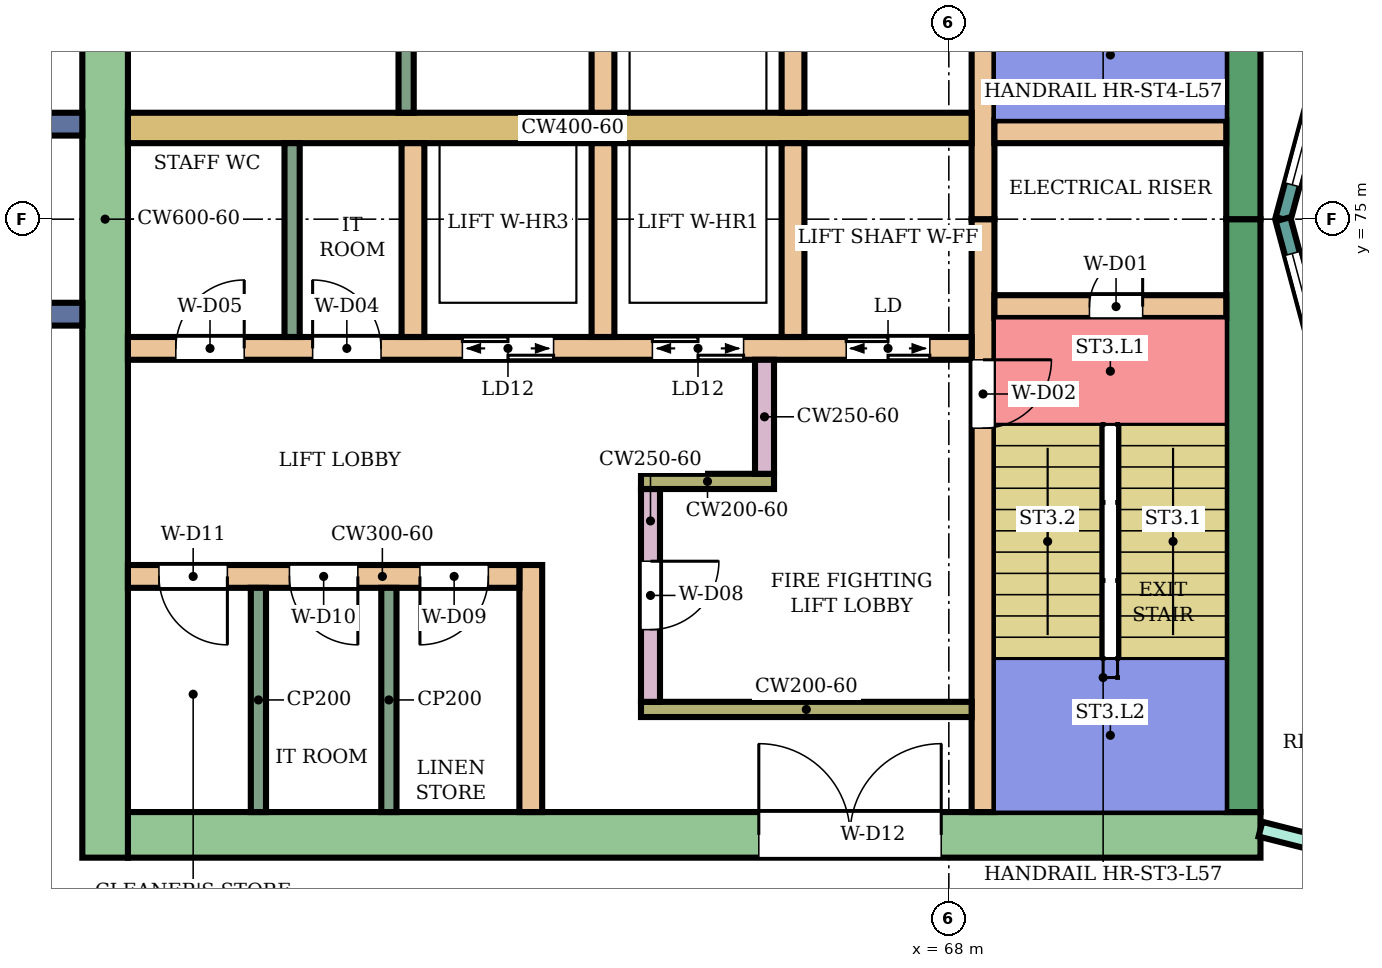
"""IFC4 building model, lengths in metres.
Left out: names, types, materials, properties, quantities, classifications, styles, units other than length and angle.
Written with IfcOpenShell. Run it as: python <this file> out.ifc"""

import sys

from ifc_helpers import new_model, si_unit, direction, frame, frame_2d, origin, place, context, subcontext, project, spatial, rectangle, extrude, element, fill, save


model = new_model("IFC4")
c1 = context("Model", 3, precision=1e-05, world=origin(), true_north=direction((0.0, 1.0)))
c2 = subcontext(c1, "Body", "Model", "MODEL_VIEW")
j1 = project(units=[si_unit("LENGTHUNIT", "METRE"), si_unit("PLANEANGLEUNIT", "RADIAN")], contexts=[c1])
p1 = place(None, origin())
s1 = spatial("IfcSite", under=j1, at=p1, CompositionType="ELEMENT")
p2 = place(p1, origin())
s2 = spatial("IfcBuilding", under=s1, at=p2, CompositionType="ELEMENT")
p3 = place(p2, frame((0.0, 0.0, 249.9)))
s3 = spatial("IfcBuildingStorey", under=s2, at=p3, CompositionType="ELEMENT", Elevation=249.9)
p4 = place(p3, frame((72.1, 66.9, 0.0), z_axis=(0.0, 0.0, 1.0), x_axis=(-1.0, 0.0, 0.0)))
e1 = element("IfcWall", 1, at=p4, inside=s3, PredefinedType="SHEAR", context=c2, shape_type="SweptSolid", body=[
    extrude(rectangle(XDim=14.9, YDim=0.6, at=frame_2d((7.45, 0.0))), origin(), (0.0, 0.0, 1.0), 3.88),
])
p5 = place(p4, frame((4.2, 0.0, 0.0)))
e2 = element("IfcOpeningElement", 2, at=p5, cuts=e1, PredefinedType="OPENING", context=c2, shape_type="SweptSolid", body=[
    extrude(rectangle(XDim=2.4, YDim=2.4, at=frame_2d((1.2, 1.2))), frame((0.0, 0.31, 0.0), z_axis=(0.0, -1.0, 0.0), x_axis=(1.0, 0.0, 0.0)), (0.0, 0.0, 1.0), 0.62),
])
for number, where, z_axis, x_axis in (
    (3, (71.875, 75.0, 0.0), (0.0, 0.0, 1.0), (0.0, -1.0, 0.0)),
    (4, (71.875, 82.8, 0.0), (0.0, 0.0, 1.0), (0.0, -1.0, 0.0)),
):
    element("IfcWall", number, at=place(p3, frame(where, z_axis=z_axis, x_axis=x_axis)), inside=s3, PredefinedType="SHEAR", context=c2, shape_type="SweptSolid", body=[
        extrude(rectangle(XDim=7.8, YDim=0.45, at=frame_2d((3.9, 0.0))), origin(), (0.0, 0.0, 1.0), 3.88),
    ])
p6 = place(p3, frame((56.9, 83.4, 0.0), z_axis=(0.0, 0.0, 1.0), x_axis=(0.0, -1.0, 0.0)))
e5 = element("IfcWall", 5, at=p6, inside=s3, PredefinedType="SHEAR", context=c2, shape_type="SweptSolid", body=[
    extrude(rectangle(XDim=16.8, YDim=0.6, at=frame_2d((8.4, 0.0))), origin(), (0.0, 0.0, 1.0), 3.88),
])
p7 = place(p3, frame((68.45, 75.0, 0.0), z_axis=(0.0, 0.0, 1.0), x_axis=(0.0, -1.0, 0.0)))
e6 = element("IfcWall", 6, at=p7, inside=s3, PredefinedType="SHEAR", context=c2, shape_type="SweptSolid", body=[
    extrude(rectangle(XDim=7.8, YDim=0.3, at=frame_2d((3.9, 0.0))), origin(), (0.0, 0.0, 1.0), 3.88),
])
p8 = place(p7, frame((1.85, 0.0, 0.0)))
e7 = element("IfcOpeningElement", 7, at=p8, cuts=e6, PredefinedType="OPENING", context=c2, shape_type="SweptSolid", body=[
    extrude(rectangle(XDim=0.9, YDim=2.1, at=frame_2d((0.45, 1.05))), frame((0.0, 0.16, 0.0), z_axis=(0.0, -1.0, 0.0), x_axis=(1.0, 0.0, 0.0)), (0.0, 0.0, 1.0), 0.32),
])
p9 = place(p3, frame((68.45, 82.8, 0.0), z_axis=(0.0, 0.0, 1.0), x_axis=(0.0, -1.0, 0.0)))
e8 = element("IfcWall", 8, at=p9, inside=s3, PredefinedType="SHEAR", context=c2, shape_type="SweptSolid", body=[
    extrude(rectangle(XDim=7.8, YDim=0.3, at=frame_2d((3.9, 0.0))), origin(), (0.0, 0.0, 1.0), 3.88),
])
p10 = place(p9, frame((0.45, 0.0, 0.0)))
e9 = element("IfcOpeningElement", 9, at=p10, cuts=e8, PredefinedType="OPENING", context=c2, shape_type="SweptSolid", body=[
    extrude(rectangle(XDim=0.9, YDim=2.1, at=frame_2d((0.45, 1.05))), frame((0.0, 0.16, 0.0), z_axis=(0.0, -1.0, 0.0), x_axis=(1.0, 0.0, 0.0)), (0.0, 0.0, 1.0), 0.32),
])
p11 = place(p3, frame((71.65, 73.85, 0.0), z_axis=(0.0, 0.0, 1.0), x_axis=(-1.0, 0.0, 0.0)))
e10 = element("IfcWall", 10, at=p11, inside=s3, PredefinedType="SHEAR", context=c2, shape_type="SweptSolid", body=[
    extrude(rectangle(XDim=3.05, YDim=0.3, at=frame_2d((1.525, 0.0))), origin(), (0.0, 0.0, 1.0), 3.88),
])
p12 = place(p11, frame((1.1, 0.0, 0.0)))
e11 = element("IfcOpeningElement", 11, at=p12, cuts=e10, PredefinedType="OPENING", context=c2, shape_type="SweptSolid", body=[
    extrude(rectangle(XDim=0.7, YDim=2.0, at=frame_2d((0.35, 1.0))), frame((0.0, 0.16, 0.0), z_axis=(0.0, -1.0, 0.0), x_axis=(1.0, 0.0, 0.0)), (0.0, 0.0, 1.0), 0.32),
])
p13 = place(p3, frame((71.65, 76.15, 0.0), z_axis=(0.0, 0.0, 1.0), x_axis=(-1.0, 0.0, 0.0)))
e12 = element("IfcWall", 12, at=p13, inside=s3, PredefinedType="SHEAR", context=c2, shape_type="SweptSolid", body=[
    extrude(rectangle(XDim=3.05, YDim=0.3, at=frame_2d((1.525, 0.0))), origin(), (0.0, 0.0, 1.0), 3.88),
])
p14 = place(p3, frame((68.3, 73.3, 0.0), z_axis=(0.0, 0.0, 1.0), x_axis=(-1.0, 0.0, 0.0)))
e13 = element("IfcWall", 13, at=p14, inside=s3, PredefinedType="SHEAR", context=c2, shape_type="SweptSolid", body=[
    extrude(rectangle(XDim=11.1, YDim=0.3, at=frame_2d((5.55, 0.0))), origin(), (0.0, 0.0, 1.0), 3.88),
])
p15 = place(p14, frame((0.55, 0.0, 0.0)))
e14 = element("IfcOpeningElement", 14, at=p15, cuts=e13, PredefinedType="OPENING", context=c2, shape_type="SweptSolid", body=[
    extrude(rectangle(XDim=1.1, YDim=2.1, at=frame_2d((0.55, 1.05))), frame((0.0, 0.16, 0.0), z_axis=(0.0, -1.0, 0.0), x_axis=(1.0, 0.0, 0.0)), (0.0, 0.0, 1.0), 0.32),
])
p16 = place(p14, frame((3.0, 0.0, 0.0)))
e15 = element("IfcOpeningElement", 15, at=p16, cuts=e13, PredefinedType="OPENING", context=c2, shape_type="SweptSolid", body=[
    extrude(rectangle(XDim=1.2, YDim=2.1, at=frame_2d((0.6, 1.05))), frame((0.0, 0.16, 0.0), z_axis=(0.0, -1.0, 0.0), x_axis=(1.0, 0.0, 0.0)), (0.0, 0.0, 1.0), 0.32),
])
p17 = place(p14, frame((5.5, 0.0, 0.0)))
e16 = element("IfcOpeningElement", 16, at=p17, cuts=e13, PredefinedType="OPENING", context=c2, shape_type="SweptSolid", body=[
    extrude(rectangle(XDim=1.2, YDim=2.1, at=frame_2d((0.6, 1.05))), frame((0.0, 0.16, 0.0), z_axis=(0.0, -1.0, 0.0), x_axis=(1.0, 0.0, 0.0)), (0.0, 0.0, 1.0), 0.32),
])
p18 = place(p14, frame((7.77, 0.0, 0.0)))
e17 = element("IfcOpeningElement", 17, at=p18, cuts=e13, PredefinedType="OPENING", context=c2, shape_type="SweptSolid", body=[
    extrude(rectangle(XDim=0.9, YDim=2.1, at=frame_2d((0.45, 1.05))), frame((0.0, 0.16, 0.0), z_axis=(0.0, -1.0, 0.0), x_axis=(1.0, 0.0, 0.0)), (0.0, 0.0, 1.0), 0.32),
])
p19 = place(p14, frame((9.57, 0.0, 0.0)))
e18 = element("IfcOpeningElement", 18, at=p19, cuts=e13, PredefinedType="OPENING", context=c2, shape_type="SweptSolid", body=[
    extrude(rectangle(XDim=0.9, YDim=2.1, at=frame_2d((0.45, 1.05))), frame((0.0, 0.16, 0.0), z_axis=(0.0, -1.0, 0.0), x_axis=(1.0, 0.0, 0.0)), (0.0, 0.0, 1.0), 0.32),
])
p20 = place(p3, frame((68.3, 76.2, 0.0), z_axis=(0.0, 0.0, 1.0), x_axis=(-1.0, 0.0, 0.0)))
e19 = element("IfcWall", 19, at=p20, inside=s3, PredefinedType="SHEAR", context=c2, shape_type="SweptSolid", body=[
    extrude(rectangle(XDim=11.1, YDim=0.4, at=frame_2d((5.55, 0.0))), origin(), (0.0, 0.0, 1.0), 3.88),
])
for number, where, z_axis, x_axis in (
    (20, (65.95, 76.0, 0.0), (0.0, 0.0, 1.0), (0.0, -1.0, 0.0)),
    (21, (63.45, 76.0, 0.0), (0.0, 0.0, 1.0), (0.0, -1.0, 0.0)),
    (22, (60.95, 76.0, 0.0), (0.0, 0.0, 1.0), (0.0, -1.0, 0.0)),
    (23, (65.95, 78.95, 0.0), (0.0, 0.0, 1.0), (0.0, -1.0, 0.0)),
    (24, (63.45, 78.95, 0.0), (0.0, 0.0, 1.0), (0.0, -1.0, 0.0)),
):
    element("IfcWall", number, at=place(p3, frame(where, z_axis=z_axis, x_axis=x_axis)), inside=s3, PredefinedType="SHEAR", context=c2, shape_type="SweptSolid", body=[
        extrude(rectangle(XDim=2.55, YDim=0.3, at=frame_2d((1.275, 0.0))), origin(), (0.0, 0.0, 1.0), 3.88),
    ])
p21 = place(p3, frame((68.3, 68.55, 0.0), z_axis=(0.0, 0.0, 1.0), x_axis=(-1.0, 0.0, 0.0)))
e25 = element("IfcWall", 25, at=p21, inside=s3, PredefinedType="SHEAR", context=c2, shape_type="SweptSolid", body=[
    extrude(rectangle(XDim=4.35, YDim=0.2, at=frame_2d((2.175, 0.0))), origin(), (0.0, 0.0, 1.0), 3.88),
])
p22 = place(p3, frame((64.075, 71.45, 0.0), z_axis=(0.0, 0.0, 1.0), x_axis=(0.0, -1.0, 0.0)))
e26 = element("IfcWall", 26, at=p22, inside=s3, PredefinedType="SHEAR", context=c2, shape_type="SweptSolid", body=[
    extrude(rectangle(XDim=2.8, YDim=0.25, at=frame_2d((1.4, 0.0))), origin(), (0.0, 0.0, 1.0), 3.88),
])
p23 = place(p22, frame((0.95, 0.0, 0.0)))
e27 = element("IfcOpeningElement", 27, at=p23, cuts=e26, PredefinedType="OPENING", context=c2, shape_type="SweptSolid", body=[
    extrude(rectangle(XDim=0.9, YDim=2.1, at=frame_2d((0.45, 1.05))), frame((0.0, 0.135, 0.0), z_axis=(0.0, -1.0, 0.0), x_axis=(1.0, 0.0, 0.0)), (0.0, 0.0, 1.0), 0.27),
])
p24 = place(p3, frame((65.7, 71.55, 0.0), z_axis=(0.0, 0.0, 1.0), x_axis=(-1.0, 0.0, 0.0)))
e28 = element("IfcWall", 28, at=p24, inside=s3, PredefinedType="SHEAR", context=c2, shape_type="SweptSolid", body=[
    extrude(rectangle(XDim=1.75, YDim=0.2, at=frame_2d((0.875, 0.0))), origin(), (0.0, 0.0, 1.0), 3.88),
])
p25 = place(p3, frame((65.575, 73.15, 0.0), z_axis=(0.0, 0.0, 1.0), x_axis=(0.0, -1.0, 0.0)))
e29 = element("IfcWall", 29, at=p25, inside=s3, PredefinedType="SHEAR", context=c2, shape_type="SweptSolid", body=[
    extrude(rectangle(XDim=1.5, YDim=0.25, at=frame_2d((0.75, 0.0))), origin(), (0.0, 0.0, 1.0), 3.88),
])
p26 = place(p3, frame((62.5, 70.45, 0.0), z_axis=(0.0, 0.0, 1.0), x_axis=(0.0, -1.0, 0.0)))
e30 = element("IfcWall", 30, at=p26, inside=s3, PredefinedType="SHEAR", context=c2, shape_type="SweptSolid", body=[
    extrude(rectangle(XDim=3.25, YDim=0.3, at=frame_2d((1.625, 0.0))), origin(), (0.0, 0.0, 1.0), 3.88),
])
p27 = place(p3, frame((62.35, 70.3, 0.0), z_axis=(0.0, 0.0, 1.0), x_axis=(-1.0, 0.0, 0.0)))
e31 = element("IfcWall", 31, at=p27, inside=s3, PredefinedType="SHEAR", context=c2, shape_type="SweptSolid", body=[
    extrude(rectangle(XDim=5.15, YDim=0.3, at=frame_2d((2.575, 0.0))), origin(), (0.0, 0.0, 1.0), 3.88),
])
p28 = place(p27, frame((0.408, 0.0, 0.0)))
e32 = element("IfcOpeningElement", 32, at=p28, cuts=e31, PredefinedType="OPENING", context=c2, shape_type="SweptSolid", body=[
    extrude(rectangle(XDim=0.9, YDim=2.1, at=frame_2d((0.45, 1.05))), frame((0.0, 0.16, 0.0), z_axis=(0.0, -1.0, 0.0), x_axis=(1.0, 0.0, 0.0)), (0.0, 0.0, 1.0), 0.32),
])
p29 = place(p27, frame((2.125, 0.0, 0.0)))
e33 = element("IfcOpeningElement", 33, at=p29, cuts=e31, PredefinedType="OPENING", context=c2, shape_type="SweptSolid", body=[
    extrude(rectangle(XDim=0.9, YDim=2.1, at=frame_2d((0.45, 1.05))), frame((0.0, 0.16, 0.0), z_axis=(0.0, -1.0, 0.0), x_axis=(1.0, 0.0, 0.0)), (0.0, 0.0, 1.0), 0.32),
])
p30 = place(p27, frame((3.842, 0.0, 0.0)))
e34 = element("IfcOpeningElement", 34, at=p30, cuts=e31, PredefinedType="OPENING", context=c2, shape_type="SweptSolid", body=[
    extrude(rectangle(XDim=0.9, YDim=2.1, at=frame_2d((0.45, 1.05))), frame((0.0, 0.16, 0.0), z_axis=(0.0, -1.0, 0.0), x_axis=(1.0, 0.0, 0.0)), (0.0, 0.0, 1.0), 0.32),
])
for number, where, z_axis, x_axis in (
    (35, (56.6, 76.25, 0.0), (0.0, 0.0, 1.0), (-1.0, 0.0, 0.0)),
    (36, (56.6, 73.75, 0.0), (0.0, 0.0, 1.0), (-1.0, 0.0, 0.0)),
):
    element("IfcWall", number, at=place(p3, frame(where, z_axis=z_axis, x_axis=x_axis)), inside=s3, PredefinedType="NOTDEFINED", context=c2, shape_type="SweptSolid", body=[
        extrude(rectangle(XDim=2.416, YDim=0.3, at=frame_2d((1.208, 0.0))), origin(), (0.0, 0.0, 1.0), 4.2),
    ])
p31 = place(p3, frame((73.415, 78.802, 0.0), z_axis=(0.0, 0.0, 1.0), x_axis=(-0.258789828301, -0.965933654434, 0.0)))
e37 = element("IfcWall", 37, at=p31, inside=s3, PredefinedType="NOTDEFINED", context=c2, shape_type="SweptSolid", body=[
    extrude(rectangle(XDim=3.936, YDim=0.2, at=frame_2d((1.968, 0.0))), origin(), (0.0, 0.0, 1.0), 4.2),
])
p32 = place(p31, frame((0.468, 0.0, 0.9)))
e38 = element("IfcOpeningElement", 38, at=p32, cuts=e37, PredefinedType="OPENING", context=c2, shape_type="SweptSolid", body=[
    extrude(rectangle(XDim=3.0, YDim=2.3, at=frame_2d((1.5, 1.15))), frame((0.0, 0.11, 0.0), z_axis=(0.0, -1.0, 0.0), x_axis=(1.0, 0.0, 0.0)), (0.0, 0.0, 1.0), 0.22),
])
p33 = place(p3, frame((72.396, 75.0, 0.0), z_axis=(0.0, 0.0, 1.0), x_axis=(0.258789828301, -0.965933654434, 0.0)))
e39 = element("IfcWall", 39, at=p33, inside=s3, PredefinedType="NOTDEFINED", context=c2, shape_type="SweptSolid", body=[
    extrude(rectangle(XDim=3.936, YDim=0.2, at=frame_2d((1.968, 0.0))), origin(), (0.0, 0.0, 1.0), 4.2),
])
p34 = place(p33, frame((0.468, 0.0, 0.9)))
e40 = element("IfcOpeningElement", 40, at=p34, cuts=e39, PredefinedType="OPENING", context=c2, shape_type="SweptSolid", body=[
    extrude(rectangle(XDim=3.0, YDim=2.3, at=frame_2d((1.5, 1.15))), frame((0.0, 0.11, 0.0), z_axis=(0.0, -1.0, 0.0), x_axis=(1.0, 0.0, 0.0)), (0.0, 0.0, 1.0), 0.22),
])
p35 = place(p3, frame((72.1, 66.975, 0.0), z_axis=(0.0, 0.0, 1.0), x_axis=(0.969471314457, -0.245204752086, 0.0)))
e41 = element("IfcWall", 41, at=p35, inside=s3, PredefinedType="PARTITIONING", context=c2, shape_type="SweptSolid", body=[
    extrude(rectangle(XDim=2.582, YDim=0.2, at=frame_2d((1.291, 0.0))), origin(), (0.0, 0.0, 1.0), 3.75),
])
p36 = place(p35, frame((0.841, 0.0, 0.0)))
e42 = element("IfcOpeningElement", 42, at=p36, cuts=e41, PredefinedType="OPENING", context=c2, shape_type="SweptSolid", body=[
    extrude(rectangle(XDim=0.9, YDim=2.1, at=frame_2d((0.45, 1.05))), frame((0.0, 0.11, 0.0), z_axis=(0.0, -1.0, 0.0), x_axis=(1.0, 0.0, 0.0)), (0.0, 0.0, 1.0), 0.22),
])
for number, where, z_axis, x_axis in (
    (43, (59.36, 76.0, 0.0), (0.0, 0.0, 1.0), (0.0, -1.0, 0.0)),
    (44, (60.86, 78.95, 0.0), (0.0, 0.0, 1.0), (0.0, -1.0, 0.0)),
):
    element("IfcWall", number, at=place(p3, frame(where, z_axis=z_axis, x_axis=x_axis)), inside=s3, PredefinedType="PARTITIONING", context=c2, shape_type="SweptSolid", body=[
        extrude(rectangle(XDim=2.55, YDim=0.2, at=frame_2d((1.275, 0.0))), origin(), (0.0, 0.0, 1.0), 3.88),
    ])
for number, where, z_axis, x_axis in (
    (45, (60.633, 70.15, 0.0), (0.0, 0.0, 1.0), (0.0, -1.0, 0.0)),
    (46, (58.917, 70.15, 0.0), (0.0, 0.0, 1.0), (0.0, -1.0, 0.0)),
):
    element("IfcWall", number, at=place(p3, frame(where, z_axis=z_axis, x_axis=x_axis)), inside=s3, PredefinedType="PARTITIONING", context=c2, shape_type="SweptSolid", body=[
        extrude(rectangle(XDim=2.95, YDim=0.2, at=frame_2d((1.475, 0.0))), origin(), (0.0, 0.0, 1.0), 3.88),
    ])
p37 = place(p32, origin())
e47 = element("IfcWindow", 47, at=p37, inside=s3, PartitioningType="SINGLE_PANEL", PredefinedType="WINDOW", context=c2, shape_type="SweptSolid", body=[
    extrude(rectangle(XDim=3.0, YDim=2.3, at=frame_2d((1.5, 1.15))), frame((0.0, 0.03, 0.0), z_axis=(0.0, -1.0, 0.0), x_axis=(1.0, 0.0, 0.0)), (0.0, 0.0, 1.0), 0.06),
])
fill(e38, e47)
p38 = place(p34, origin())
e48 = element("IfcWindow", 48, at=p38, inside=s3, PartitioningType="SINGLE_PANEL", PredefinedType="WINDOW", context=c2, shape_type="SweptSolid", body=[
    extrude(rectangle(XDim=3.0, YDim=2.3, at=frame_2d((1.5, 1.15))), frame((0.0, 0.03, 0.0), z_axis=(0.0, -1.0, 0.0), x_axis=(1.0, 0.0, 0.0)), (0.0, 0.0, 1.0), 0.06),
])
fill(e40, e48)
p39 = place(p12, frame((0.7, 0.0, 0.0), z_axis=(0.0, 0.0, 1.0), x_axis=(-1.0, 0.0, 0.0)))
e49 = element("IfcDoor", 49, at=p39, inside=s3, OperationType="SINGLE_SWING_RIGHT", PredefinedType="DOOR", context=c2, shape_type="SweptSolid", body=[
    extrude(rectangle(XDim=0.7, YDim=2.0, at=frame_2d((0.35, 1.0))), frame((0.0, 0.025, 0.0), z_axis=(0.0, -1.0, 0.0), x_axis=(1.0, 0.0, 0.0)), (0.0, 0.0, 1.0), 0.05),
])
fill(e11, e49)
p40 = place(p8, origin())
e50 = element("IfcDoor", 50, at=p40, inside=s3, OperationType="SINGLE_SWING_LEFT", PredefinedType="DOOR", context=c2, shape_type="SweptSolid", body=[
    extrude(rectangle(XDim=0.9, YDim=2.1, at=frame_2d((0.45, 1.05))), frame((0.0, 0.025, 0.0), z_axis=(0.0, -1.0, 0.0), x_axis=(1.0, 0.0, 0.0)), (0.0, 0.0, 1.0), 0.05),
])
fill(e7, e50)
p41 = place(p15, origin())
e51 = element("IfcDoor", 51, at=p41, inside=s3, OperationType="DOUBLE_DOOR_SLIDING", PredefinedType="DOOR", context=c2, shape_type="SweptSolid", body=[
    extrude(rectangle(XDim=1.1, YDim=2.1, at=frame_2d((0.55, 1.05))), frame((0.0, 0.025, 0.0), z_axis=(0.0, -1.0, 0.0), x_axis=(1.0, 0.0, 0.0)), (0.0, 0.0, 1.0), 0.05),
])
fill(e14, e51)
p42 = place(p16, origin())
e52 = element("IfcDoor", 52, at=p42, inside=s3, OperationType="DOUBLE_DOOR_SLIDING", PredefinedType="DOOR", context=c2, shape_type="SweptSolid", body=[
    extrude(rectangle(XDim=1.2, YDim=2.1, at=frame_2d((0.6, 1.05))), frame((0.0, 0.025, 0.0), z_axis=(0.0, -1.0, 0.0), x_axis=(1.0, 0.0, 0.0)), (0.0, 0.0, 1.0), 0.05),
])
fill(e15, e52)
p43 = place(p17, origin())
e53 = element("IfcDoor", 53, at=p43, inside=s3, OperationType="DOUBLE_DOOR_SLIDING", PredefinedType="DOOR", context=c2, shape_type="SweptSolid", body=[
    extrude(rectangle(XDim=1.2, YDim=2.1, at=frame_2d((0.6, 1.05))), frame((0.0, 0.025, 0.0), z_axis=(0.0, -1.0, 0.0), x_axis=(1.0, 0.0, 0.0)), (0.0, 0.0, 1.0), 0.05),
])
fill(e16, e53)
p44 = place(p18, frame((0.9, 0.0, 0.0), z_axis=(0.0, 0.0, 1.0), x_axis=(-1.0, 0.0, 0.0)))
e54 = element("IfcDoor", 54, at=p44, inside=s3, OperationType="SINGLE_SWING_LEFT", PredefinedType="DOOR", context=c2, shape_type="SweptSolid", body=[
    extrude(rectangle(XDim=0.9, YDim=2.1, at=frame_2d((0.45, 1.05))), frame((0.0, 0.025, 0.0), z_axis=(0.0, -1.0, 0.0), x_axis=(1.0, 0.0, 0.0)), (0.0, 0.0, 1.0), 0.05),
])
fill(e17, e54)
p45 = place(p19, frame((0.9, 0.0, 0.0), z_axis=(0.0, 0.0, 1.0), x_axis=(-1.0, 0.0, 0.0)))
e55 = element("IfcDoor", 55, at=p45, inside=s3, OperationType="SINGLE_SWING_RIGHT", PredefinedType="DOOR", context=c2, shape_type="SweptSolid", body=[
    extrude(rectangle(XDim=0.9, YDim=2.1, at=frame_2d((0.45, 1.05))), frame((0.0, 0.025, 0.0), z_axis=(0.0, -1.0, 0.0), x_axis=(1.0, 0.0, 0.0)), (0.0, 0.0, 1.0), 0.05),
])
fill(e18, e55)
p46 = place(p23, origin())
e56 = element("IfcDoor", 56, at=p46, inside=s3, OperationType="SINGLE_SWING_LEFT", PredefinedType="DOOR", context=c2, shape_type="SweptSolid", body=[
    extrude(rectangle(XDim=0.9, YDim=2.1, at=frame_2d((0.45, 1.05))), frame((0.0, 0.025, 0.0), z_axis=(0.0, -1.0, 0.0), x_axis=(1.0, 0.0, 0.0)), (0.0, 0.0, 1.0), 0.05),
])
fill(e27, e56)
p47 = place(p28, origin())
e57 = element("IfcDoor", 57, at=p47, inside=s3, OperationType="SINGLE_SWING_RIGHT", PredefinedType="DOOR", context=c2, shape_type="SweptSolid", body=[
    extrude(rectangle(XDim=0.9, YDim=2.1, at=frame_2d((0.45, 1.05))), frame((0.0, 0.025, 0.0), z_axis=(0.0, -1.0, 0.0), x_axis=(1.0, 0.0, 0.0)), (0.0, 0.0, 1.0), 0.05),
])
fill(e32, e57)
p48 = place(p29, origin())
e58 = element("IfcDoor", 58, at=p48, inside=s3, OperationType="SINGLE_SWING_LEFT", PredefinedType="DOOR", context=c2, shape_type="SweptSolid", body=[
    extrude(rectangle(XDim=0.9, YDim=2.1, at=frame_2d((0.45, 1.05))), frame((0.0, 0.025, 0.0), z_axis=(0.0, -1.0, 0.0), x_axis=(1.0, 0.0, 0.0)), (0.0, 0.0, 1.0), 0.05),
])
fill(e33, e58)
p49 = place(p30, origin())
e59 = element("IfcDoor", 59, at=p49, inside=s3, OperationType="SINGLE_SWING_LEFT", PredefinedType="DOOR", context=c2, shape_type="SweptSolid", body=[
    extrude(rectangle(XDim=0.9, YDim=2.1, at=frame_2d((0.45, 1.05))), frame((0.0, 0.025, 0.0), z_axis=(0.0, -1.0, 0.0), x_axis=(1.0, 0.0, 0.0)), (0.0, 0.0, 1.0), 0.05),
])
fill(e34, e59)
p50 = place(p5, frame((2.4, 0.0, 0.0), z_axis=(0.0, 0.0, 1.0), x_axis=(-1.0, 0.0, 0.0)))
e60 = element("IfcDoor", 60, at=p50, inside=s3, OperationType="DOUBLE_DOOR_SINGLE_SWING", PredefinedType="DOOR", context=c2, shape_type="SweptSolid", body=[
    extrude(rectangle(XDim=2.4, YDim=2.4, at=frame_2d((1.2, 1.2))), frame((0.0, 0.025, 0.0), z_axis=(0.0, -1.0, 0.0), x_axis=(1.0, 0.0, 0.0)), (0.0, 0.0, 1.0), 0.05),
])
fill(e2, e60)
save(model, sys.argv[1])
